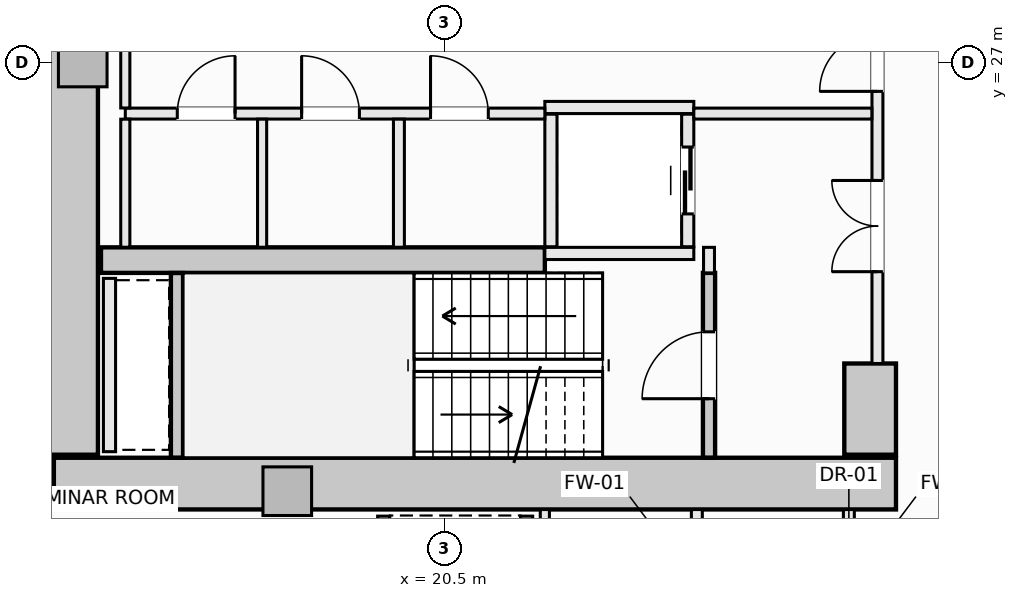
"""IFC4 building model, lengths in metres.
Left out: names, types, materials, properties, quantities, classifications, styles, units other than length and angle.
Written with IfcOpenShell. Run it as: python <this file> out.ifc"""

import sys

from ifc_helpers import new_model, si_unit, direction, frame, frame_2d, origin, origin_2d, place, context, subcontext, project, spatial, rectangle, extrude, element, fill, save


model = new_model("IFC4")
c1 = context("Model", 3, precision=1e-05, world=origin(), true_north=direction((0.0, 1.0)))
c2 = subcontext(c1, "Body", "Model", "MODEL_VIEW")
j1 = project(units=[si_unit("LENGTHUNIT", "METRE"), si_unit("PLANEANGLEUNIT", "RADIAN")], contexts=[c1])
p1 = place(None, origin())
s1 = spatial("IfcSite", under=j1, at=p1, CompositionType="ELEMENT")
p2 = place(p1, origin())
s2 = spatial("IfcBuilding", under=s1, at=p2, CompositionType="ELEMENT")
p3 = place(p2, frame((0.0, 0.0, 88.1)))
s3 = spatial("IfcBuildingStorey", under=s2, at=p3, CompositionType="ELEMENT", Elevation=88.1)
p4 = place(p3, frame((14.075, 20.075, -0.28), z_axis=(0.0, 0.0, 1.0), x_axis=(1.0, 0.0, 0.0)))
e1 = element("IfcWall", 1, at=p4, inside=s3, PredefinedType="SHEAR", context=c2, shape_type="SweptSolid", body=[
    extrude(rectangle(XDim=13.85, YDim=0.85, at=frame_2d((6.925, 0.0))), origin(), (0.0, 0.0, 1.0), 3.85),
])
p5 = place(p3, frame((14.375, 20.55, -0.28), z_axis=(0.0, 0.0, 1.0), x_axis=(0.0, 1.0, 0.0)))
e2 = element("IfcWall", 2, at=p5, inside=s3, PredefinedType="SHEAR", context=c2, shape_type="SweptSolid", body=[
    extrude(rectangle(XDim=12.9, YDim=0.85, at=frame_2d((6.45, 0.0))), origin(), (0.0, 0.0, 1.0), 3.85),
])
p6 = place(p3, frame((27.5, 20.55, -0.28), z_axis=(0.0, 0.0, 1.0), x_axis=(0.0, 1.0, 0.0)))
e3 = element("IfcWall", 3, at=p6, inside=s3, PredefinedType="SHEAR", context=c2, shape_type="SweptSolid", body=[
    extrude(rectangle(XDim=1.5, YDim=0.85, at=frame_2d((0.75, 0.0))), origin(), (0.0, 0.0, 1.0), 3.85),
])
p7 = place(p3, frame((14.85, 23.75, -0.28), z_axis=(0.0, 0.0, 1.0), x_axis=(1.0, 0.0, 0.0)))
e4 = element("IfcWall", 4, at=p7, inside=s3, PredefinedType="SHEAR", context=c2, shape_type="SweptSolid", body=[
    extrude(rectangle(XDim=7.3, YDim=0.42, at=frame_2d((3.65, 0.0))), origin(), (0.0, 0.0, 1.0), 3.85),
])
for number, where, z_axis, x_axis in (
    (5, (14.55, 27.0, -0.28), (0.0, 0.0, 1.0), (1.0, 0.0, 0.0)),
    (6, (17.914, 19.95, -0.28), (0.0, 0.0, 1.0), (1.0, 0.0, 0.0)),
):
    element("IfcColumn", number, at=place(p3, frame(where, z_axis=z_axis, x_axis=x_axis)), inside=s3, PredefinedType="PILASTER", context=c2, shape_type="SweptSolid", body=[
        extrude(rectangle(XDim=0.8, YDim=0.8, at=origin_2d()), origin(), (0.0, 0.0, 1.0), 3.85),
    ])
p8 = place(p3, frame((24.85, 20.502, -0.28), z_axis=(0.0, 0.0, 1.0), x_axis=(0.0, 1.0, 0.0)))
e7 = element("IfcWall", 7, at=p8, inside=s3, PredefinedType="SHEAR", context=c2, shape_type="SweptSolid", body=[
    extrude(rectangle(XDim=3.038, YDim=0.2, at=frame_2d((1.519, 0.0))), origin(), (0.0, 0.0, 1.0), 3.85),
])
p9 = place(p8, frame((0.969, 0.0, 0.28)))
e8 = element("IfcOpeningElement", 8, at=p9, cuts=e7, PredefinedType="OPENING", context=c2, shape_type="SweptSolid", body=[
    extrude(rectangle(XDim=1.1, YDim=2.15, at=frame_2d((0.55, 1.075))), frame((0.0, 0.11, 0.0), z_axis=(0.0, -1.0, 0.0), x_axis=(1.0, 0.0, 0.0)), (0.0, 0.0, 1.0), 0.22),
])
p10 = place(p3, frame((16.1, 20.502, -0.28), z_axis=(0.0, 0.0, 1.0), x_axis=(0.0, 1.0, 0.0)))
e9 = element("IfcWall", 9, at=p10, inside=s3, PredefinedType="SHEAR", context=c2, shape_type="SweptSolid", body=[
    extrude(rectangle(XDim=3.036, YDim=0.2, at=frame_2d((1.518, 0.0))), origin(), (0.0, 0.0, 1.0), 3.85),
])
for number, where, z_axis, x_axis in (
    (10, (22.15, 26.26, 0.0), (0.0, 0.0, 1.0), (1.0, 0.0, 0.0)),
    (11, (22.15, 23.86, 0.0), (0.0, 0.0, 1.0), (1.0, 0.0, 0.0)),
):
    element("IfcWall", number, at=place(p3, frame(where, z_axis=z_axis, x_axis=x_axis)), inside=s3, PredefinedType="SOLIDWALL", context=c2, shape_type="SweptSolid", body=[
        extrude(rectangle(XDim=2.45, YDim=0.2, at=frame_2d((1.225, 0.0))), origin(), (0.0, 0.0, 1.0), 3.57),
    ])
p11 = place(p3, frame((22.25, 23.97, 0.0), z_axis=(0.0, 0.0, 1.0), x_axis=(0.0, 1.0, 0.0)))
e12 = element("IfcWall", 12, at=p11, inside=s3, PredefinedType="SOLIDWALL", context=c2, shape_type="SweptSolid", body=[
    extrude(rectangle(XDim=2.18, YDim=0.2, at=frame_2d((1.09, 0.0))), origin(), (0.0, 0.0, 1.0), 3.57),
])
p12 = place(p3, frame((24.5, 23.97, 0.0), z_axis=(0.0, 0.0, 1.0), x_axis=(0.0, 1.0, 0.0)))
e13 = element("IfcWall", 13, at=p12, inside=s3, PredefinedType="SOLIDWALL", context=c2, shape_type="SweptSolid", body=[
    extrude(rectangle(XDim=2.18, YDim=0.2, at=frame_2d((1.09, 0.0))), origin(), (0.0, 0.0, 1.0), 3.57),
])
p13 = place(p12, frame((0.54, 0.0, 0.0)))
e14 = element("IfcOpeningElement", 14, at=p13, cuts=e13, PredefinedType="OPENING", context=c2, shape_type="SweptSolid", body=[
    extrude(rectangle(XDim=1.1, YDim=2.2, at=frame_2d((0.55, 1.1))), frame((0.0, 0.11, 0.0), z_axis=(0.0, -1.0, 0.0), x_axis=(1.0, 0.0, 0.0)), (0.0, 0.0, 1.0), 0.22),
])
for number, where, z_axis, x_axis in (
    (15, (19.5, 17.01, 0.0), (0.0, 0.0, 1.0), (0.0, 1.0, 0.0)),
    (16, (21.85, 17.01, 0.0), (0.0, 0.0, 1.0), (0.0, 1.0, 0.0)),
):
    element("IfcWall", number, at=place(p3, frame(where, z_axis=z_axis, x_axis=x_axis)), inside=s3, PredefinedType="SOLIDWALL", context=c2, shape_type="SweptSolid", body=[
        extrude(rectangle(XDim=2.53, YDim=0.2, at=frame_2d((1.265, 0.0))), origin(), (0.0, 0.0, 1.0), 3.57),
    ])
p14 = place(p3, frame((14.99, 20.6, 0.0), z_axis=(0.0, 0.0, 1.0), x_axis=(0.0, 1.0, 0.0)))
e17 = element("IfcWall", 17, at=p14, inside=s3, PredefinedType="SOLIDWALL", context=c2, shape_type="SweptSolid", body=[
    extrude(rectangle(XDim=2.85, YDim=0.2, at=frame_2d((1.425, 0.0))), origin(), (0.0, 0.0, 1.0), 3.57),
])
p15 = place(p3, frame((24.85, 23.54, 0.0), z_axis=(0.0, 0.0, 1.0), x_axis=(0.0, 1.0, 0.0)))
e18 = element("IfcWall", 18, at=p15, inside=s3, PredefinedType="SOLIDWALL", context=c2, shape_type="SweptSolid", body=[
    extrude(rectangle(XDim=0.42, YDim=0.18, at=frame_2d((0.21, 0.0))), origin(), (0.0, 0.0, 1.0), 3.57),
])
p16 = place(p3, frame((27.62, 22.05, 0.0), z_axis=(0.0, 0.0, 1.0), x_axis=(0.0, 1.0, 0.0)))
e19 = element("IfcWall", 19, at=p16, inside=s3, PredefinedType="SOLIDWALL", context=c2, shape_type="SweptSolid", body=[
    extrude(rectangle(XDim=9.9, YDim=0.18, at=frame_2d((4.95, 0.0))), origin(), (0.0, 0.0, 1.0), 2.662),
])
p17 = place(p16, frame((4.475, 0.0, 0.0)))
e20 = element("IfcOpeningElement", 20, at=p17, cuts=e19, PredefinedType="OPENING", context=c2, shape_type="SweptSolid", body=[
    extrude(rectangle(XDim=0.95, YDim=2.1, at=frame_2d((0.475, 1.05))), frame((0.0, 0.1, 0.0), z_axis=(0.0, -1.0, 0.0), x_axis=(1.0, 0.0, 0.0)), (0.0, 0.0, 1.0), 0.2),
])
p18 = place(p16, frame((6.89, 0.0, 0.0)))
e21 = element("IfcOpeningElement", 21, at=p18, cuts=e19, PredefinedType="OPENING", context=c2, shape_type="SweptSolid", body=[
    extrude(rectangle(XDim=1.5, YDim=2.2, at=frame_2d((0.75, 1.1))), frame((0.0, 0.1, 0.0), z_axis=(0.0, -1.0, 0.0), x_axis=(1.0, 0.0, 0.0)), (0.0, 0.0, 1.0), 0.2),
])
p19 = place(p16, frame((1.51, 0.0, 0.0)))
e22 = element("IfcOpeningElement", 22, at=p19, cuts=e19, PredefinedType="OPENING", context=c2, shape_type="SweptSolid", body=[
    extrude(rectangle(XDim=1.5, YDim=2.2, at=frame_2d((0.75, 1.1))), frame((0.0, 0.1, 0.0), z_axis=(0.0, -1.0, 0.0), x_axis=(1.0, 0.0, 0.0)), (0.0, 0.0, 1.0), 0.2),
])
p20 = place(p3, frame((15.25, 26.16, 0.0), z_axis=(0.0, 0.0, 1.0), x_axis=(1.0, 0.0, 0.0)))
e23 = element("IfcWall", 23, at=p20, inside=s3, PredefinedType="SOLIDWALL", context=c2, shape_type="SweptSolid", body=[
    extrude(rectangle(XDim=6.9, YDim=0.18, at=frame_2d((3.45, 0.0))), origin(), (0.0, 0.0, 1.0), 3.57),
])
p21 = place(p20, frame((5.02, 0.0, 0.0)))
e24 = element("IfcOpeningElement", 24, at=p21, cuts=e23, PredefinedType="OPENING", context=c2, shape_type="SweptSolid", body=[
    extrude(rectangle(XDim=0.95, YDim=2.1, at=frame_2d((0.475, 1.05))), frame((0.0, 0.1, 0.0), z_axis=(0.0, -1.0, 0.0), x_axis=(1.0, 0.0, 0.0)), (0.0, 0.0, 1.0), 0.2),
])
p22 = place(p20, frame((0.855, 0.0, 0.0)))
e25 = element("IfcOpeningElement", 25, at=p22, cuts=e23, PredefinedType="OPENING", context=c2, shape_type="SweptSolid", body=[
    extrude(rectangle(XDim=0.95, YDim=2.1, at=frame_2d((0.475, 1.05))), frame((0.0, 0.1, 0.0), z_axis=(0.0, -1.0, 0.0), x_axis=(1.0, 0.0, 0.0)), (0.0, 0.0, 1.0), 0.2),
])
p23 = place(p20, frame((2.9, 0.0, 0.0)))
e26 = element("IfcOpeningElement", 26, at=p23, cuts=e23, PredefinedType="OPENING", context=c2, shape_type="SweptSolid", body=[
    extrude(rectangle(XDim=0.95, YDim=2.1, at=frame_2d((0.475, 1.05))), frame((0.0, 0.1, 0.0), z_axis=(0.0, -1.0, 0.0), x_axis=(1.0, 0.0, 0.0)), (0.0, 0.0, 1.0), 0.2),
])
p24 = place(p3, frame((24.6, 26.16, 0.0), z_axis=(0.0, 0.0, 1.0), x_axis=(1.0, 0.0, 0.0)))
e27 = element("IfcWall", 27, at=p24, inside=s3, PredefinedType="SOLIDWALL", context=c2, shape_type="SweptSolid", body=[
    extrude(rectangle(XDim=2.928, YDim=0.18, at=frame_2d((1.464, 0.0))), origin(), (0.0, 0.0, 1.0), 3.57),
])
p25 = place(p3, frame((15.25, 23.962, 0.0), z_axis=(0.0, 0.0, 1.0), x_axis=(0.0, 1.0, 0.0)))
e28 = element("IfcWall", 28, at=p25, inside=s3, PredefinedType="PARTITIONING", context=c2, shape_type="SweptSolid", body=[
    extrude(rectangle(XDim=2.106, YDim=0.15, at=frame_2d((1.053, 0.0))), origin(), (0.0, 0.0, 1.0), 3.57),
])
p26 = place(p3, frame((15.25, 26.252, 0.0), z_axis=(0.0, 0.0, 1.0), x_axis=(0.0, 1.0, 0.0)))
e29 = element("IfcWall", 29, at=p26, inside=s3, PredefinedType="PARTITIONING", context=c2, shape_type="SweptSolid", body=[
    extrude(rectangle(XDim=1.496, YDim=0.15, at=frame_2d((0.748, 0.0))), origin(), (0.0, 0.0, 1.0), 3.57),
])
p27 = place(p3, frame((19.75, 23.962, 0.0), z_axis=(0.0, 0.0, 1.0), x_axis=(0.0, 1.0, 0.0)))
e30 = element("IfcWall", 30, at=p27, inside=s3, PredefinedType="SOLIDWALL", context=c2, shape_type="SweptSolid", body=[
    extrude(rectangle(XDim=2.106, YDim=0.18, at=frame_2d((1.053, 0.0))), origin(), (0.0, 0.0, 1.0), 3.57),
])
p28 = place(p3, frame((17.5, 23.962, 0.0), z_axis=(0.0, 0.0, 1.0), x_axis=(0.0, 1.0, 0.0)))
e31 = element("IfcWall", 31, at=p28, inside=s3, PredefinedType="PARTITIONING", context=c2, shape_type="SweptSolid", body=[
    extrude(rectangle(XDim=2.106, YDim=0.15, at=frame_2d((1.053, 0.0))), origin(), (0.0, 0.0, 1.0), 3.57),
])
p29 = place(p3, frame((22.15, 17.142, 0.0), z_axis=(0.0, 0.0, 1.0), x_axis=(0.0, 1.0, 0.0)))
e32 = element("IfcWall", 32, at=p29, inside=s3, PredefinedType="PARTITIONING", context=c2, shape_type="SweptSolid", body=[
    extrude(rectangle(XDim=2.506, YDim=0.15, at=frame_2d((1.253, 0.0))), origin(), (0.0, 0.0, 1.0), 3.57),
])
p30 = place(p3, frame((24.65, 17.142, 0.0), z_axis=(0.0, 0.0, 1.0), x_axis=(0.0, 1.0, 0.0)))
e33 = element("IfcWall", 33, at=p30, inside=s3, PredefinedType="SOLIDWALL", context=c2, shape_type="SweptSolid", body=[
    extrude(rectangle(XDim=2.506, YDim=0.18, at=frame_2d((1.253, 0.0))), origin(), (0.0, 0.0, 1.0), 3.57),
])
p31 = place(p30, frame((0.778, 0.0, 0.0)))
e34 = element("IfcOpeningElement", 34, at=p31, cuts=e33, PredefinedType="OPENING", context=c2, shape_type="SweptSolid", body=[
    extrude(rectangle(XDim=0.95, YDim=2.1, at=frame_2d((0.475, 1.05))), frame((0.0, 0.1, 0.0), z_axis=(0.0, -1.0, 0.0), x_axis=(1.0, 0.0, 0.0)), (0.0, 0.0, 1.0), 0.2),
])
p32 = place(p3, frame((27.15, 17.142, 0.0), z_axis=(0.0, 0.0, 1.0), x_axis=(0.0, 1.0, 0.0)))
e35 = element("IfcWall", 35, at=p32, inside=s3, PredefinedType="SOLIDWALL", context=c2, shape_type="SweptSolid", body=[
    extrude(rectangle(XDim=2.506, YDim=0.18, at=frame_2d((1.253, 0.0))), origin(), (0.0, 0.0, 1.0), 3.57),
])
p33 = place(p32, frame((0.778, 0.0, 0.0)))
e36 = element("IfcOpeningElement", 36, at=p33, cuts=e35, PredefinedType="OPENING", context=c2, shape_type="SweptSolid", body=[
    extrude(rectangle(XDim=0.95, YDim=2.1, at=frame_2d((0.475, 1.05))), frame((0.0, 0.1, 0.0), z_axis=(0.0, -1.0, 0.0), x_axis=(1.0, 0.0, 0.0)), (0.0, 0.0, 1.0), 0.2),
])
p34 = place(p9, origin())
e37 = element("IfcDoor", 37, at=p34, inside=s3, OperationType="SINGLE_SWING_LEFT", PredefinedType="DOOR", context=c2, shape_type="SweptSolid", body=[
    extrude(rectangle(XDim=1.1, YDim=2.15, at=frame_2d((0.55, 1.075))), frame((0.0, 0.025, 0.0), z_axis=(0.0, -1.0, 0.0), x_axis=(1.0, 0.0, 0.0)), (0.0, 0.0, 1.0), 0.05),
])
fill(e8, e37)
p35 = place(p13, origin())
e38 = element("IfcDoor", 38, at=p35, inside=s3, OperationType="SLIDING_TO_LEFT", PredefinedType="DOOR", context=c2, shape_type="SweptSolid", body=[
    extrude(rectangle(XDim=1.1, YDim=2.2, at=frame_2d((0.55, 1.1))), frame((0.0, 0.025, 0.0), z_axis=(0.0, -1.0, 0.0), x_axis=(1.0, 0.0, 0.0)), (0.0, 0.0, 1.0), 0.05),
])
fill(e14, e38)
p36 = place(p17, origin())
e39 = element("IfcDoor", 39, at=p36, inside=s3, OperationType="SINGLE_SWING_LEFT", PredefinedType="DOOR", context=c2, shape_type="SweptSolid", body=[
    extrude(rectangle(XDim=0.95, YDim=2.1, at=frame_2d((0.475, 1.05))), frame((0.0, 0.025, 0.0), z_axis=(0.0, -1.0, 0.0), x_axis=(1.0, 0.0, 0.0)), (0.0, 0.0, 1.0), 0.05),
])
fill(e20, e39)
p37 = place(p19, origin())
e40 = element("IfcDoor", 40, at=p37, inside=s3, OperationType="DOUBLE_DOOR_SINGLE_SWING", PredefinedType="DOOR", context=c2, shape_type="SweptSolid", body=[
    extrude(rectangle(XDim=1.5, YDim=2.2, at=frame_2d((0.75, 1.1))), frame((0.0, 0.025, 0.0), z_axis=(0.0, -1.0, 0.0), x_axis=(1.0, 0.0, 0.0)), (0.0, 0.0, 1.0), 0.05),
])
fill(e22, e40)
p38 = place(p21, origin())
e41 = element("IfcDoor", 41, at=p38, inside=s3, OperationType="SINGLE_SWING_LEFT", PredefinedType="DOOR", context=c2, shape_type="SweptSolid", body=[
    extrude(rectangle(XDim=0.95, YDim=2.1, at=frame_2d((0.475, 1.05))), frame((0.0, 0.025, 0.0), z_axis=(0.0, -1.0, 0.0), x_axis=(1.0, 0.0, 0.0)), (0.0, 0.0, 1.0), 0.05),
])
fill(e24, e41)
p39 = place(p22, origin())
e42 = element("IfcDoor", 42, at=p39, inside=s3, OperationType="SINGLE_SWING_RIGHT", PredefinedType="DOOR", context=c2, shape_type="SweptSolid", body=[
    extrude(rectangle(XDim=0.95, YDim=2.1, at=frame_2d((0.475, 1.05))), frame((0.0, 0.025, 0.0), z_axis=(0.0, -1.0, 0.0), x_axis=(1.0, 0.0, 0.0)), (0.0, 0.0, 1.0), 0.05),
])
fill(e25, e42)
p40 = place(p23, origin())
e43 = element("IfcDoor", 43, at=p40, inside=s3, OperationType="SINGLE_SWING_LEFT", PredefinedType="DOOR", context=c2, shape_type="SweptSolid", body=[
    extrude(rectangle(XDim=0.95, YDim=2.1, at=frame_2d((0.475, 1.05))), frame((0.0, 0.025, 0.0), z_axis=(0.0, -1.0, 0.0), x_axis=(1.0, 0.0, 0.0)), (0.0, 0.0, 1.0), 0.05),
])
fill(e26, e43)
save(model, sys.argv[1])
